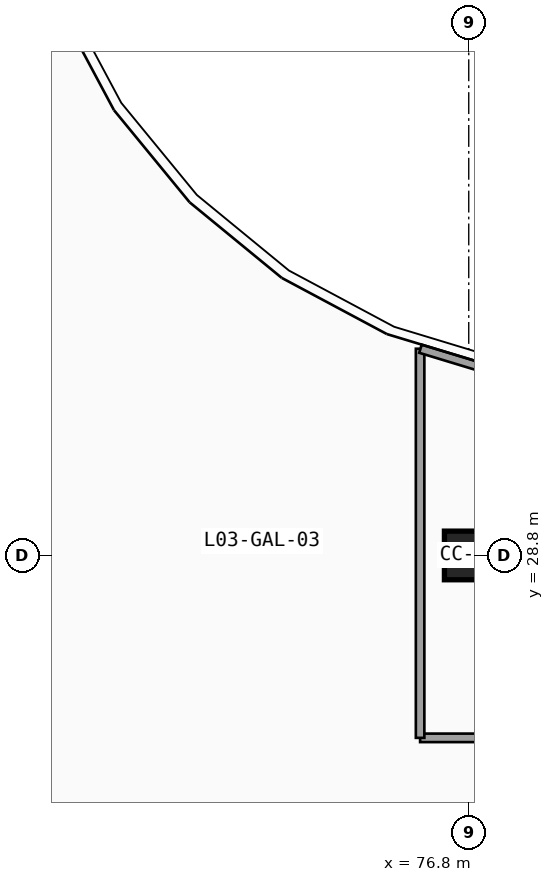
"""IFC4 building model, lengths in metres.
Left out: names, types, materials, properties, quantities, classifications, styles, units other than length and angle.
Written with IfcOpenShell. Run it as: python <this file> out.ifc"""

import sys

from ifc_helpers import new_model, si_unit, direction, frame, frame_2d, origin, origin_2d, place, context, subcontext, project, spatial, rectangle, extrude, element, save


model = new_model("IFC4")
c1 = context("Model", 3, precision=1e-05, world=origin(), true_north=direction((0.0, 1.0)))
c2 = subcontext(c1, "Body", "Model", "MODEL_VIEW")
j1 = project(units=[si_unit("LENGTHUNIT", "METRE"), si_unit("PLANEANGLEUNIT", "RADIAN")], contexts=[c1])
p1 = place(None, origin())
s1 = spatial("IfcSite", under=j1, at=p1, CompositionType="ELEMENT")
p2 = place(p1, origin())
s2 = spatial("IfcBuilding", under=s1, at=p2, CompositionType="ELEMENT")
p3 = place(p2, frame((0.0, 0.0, 14.1)))
s3 = spatial("IfcBuildingStorey", under=s2, at=p3, CompositionType="ELEMENT", Elevation=14.1)
p4 = place(p3, frame((76.8, 28.8, 0.0), z_axis=(0.0, 0.0, 1.0), x_axis=(1.0, 0.0, 0.0)))
e1 = element("IfcColumn", 1, at=p4, inside=s3, PredefinedType="COLUMN", context=c2, shape_type="SweptSolid", body=[
    extrude(rectangle(XDim=0.8, YDim=0.8, at=origin_2d()), origin(), (0.0, 0.0, 1.0), 4.5),
])
p5 = place(p3, frame((78.35, 25.8, 0.0), z_axis=(0.0, 0.0, 1.0), x_axis=(-1.0, 0.0, 0.0)))
e2 = element("IfcWall", 2, at=p5, inside=s3, PredefinedType="PARTITIONING", context=c2, shape_type="SweptSolid", body=[
    extrude(rectangle(XDim=2.35, YDim=0.14, at=frame_2d((1.175, 0.0))), origin(), (0.0, 0.0, 1.0), 3.638),
])
p6 = place(p3, frame((76.0, 25.8, 0.0), z_axis=(0.0, 0.0, 1.0), x_axis=(0.0, 1.0, 0.0)))
e3 = element("IfcWall", 3, at=p6, inside=s3, PredefinedType="PARTITIONING", context=c2, shape_type="SweptSolid", body=[
    extrude(rectangle(XDim=6.4, YDim=0.14, at=frame_2d((3.2, 0.0))), origin(), (0.0, 0.0, 1.0), 3.556),
])
p7 = place(p3, frame((76.006, 32.2, 0.0), z_axis=(0.0, 0.0, 1.0), x_axis=(0.956921766266, -0.290345885534, 0.0)))
e4 = element("IfcWall", 4, at=p7, inside=s3, PredefinedType="PARTITIONING", context=c2, shape_type="SweptSolid", body=[
    extrude(rectangle(XDim=1.441, YDim=0.14, at=frame_2d((0.721, 0.0))), origin(), (0.0, 0.0, 1.0), 4.24),
])
save(model, sys.argv[1])
